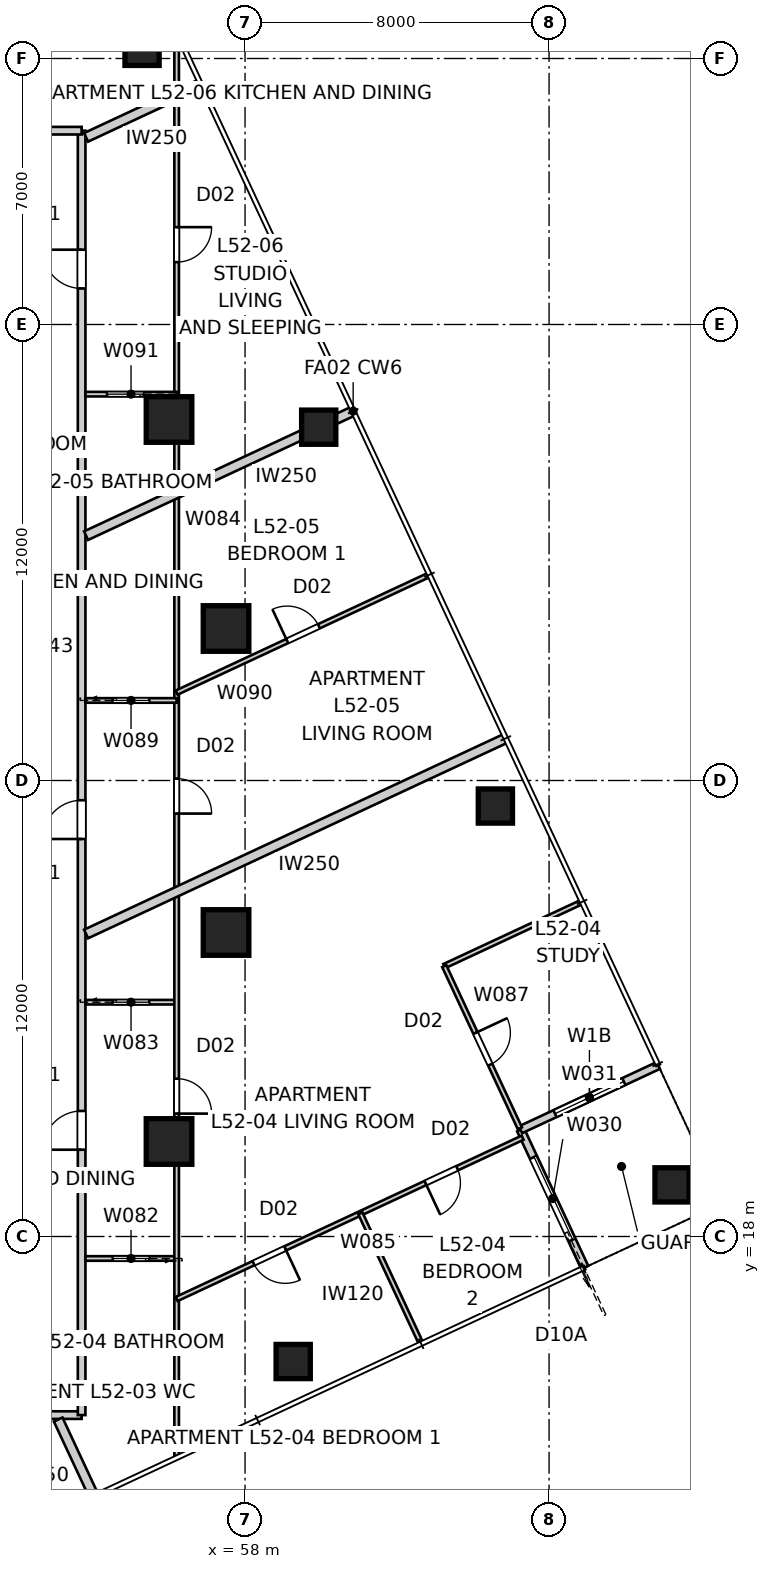
"""IFC4 building model, lengths in metres.
Left out: names, types, materials, properties, quantities, classifications, styles, units other than length and angle.
Written with IfcOpenShell. Run it as: python <this file> out.ifc"""

import sys

from ifc_helpers import new_model, si_unit, direction, frame, frame_2d, origin, origin_2d, place, context, subcontext, project, spatial, rectangle, extrude, element, fill, save


model = new_model("IFC4")
c1 = context("Model", 3, precision=1e-05, world=origin(), true_north=direction((0.0, 1.0)))
c2 = subcontext(c1, "Body", "Model", "MODEL_VIEW")
j1 = project(units=[si_unit("LENGTHUNIT", "METRE"), si_unit("PLANEANGLEUNIT", "RADIAN")], contexts=[c1])
p1 = place(None, origin())
s1 = spatial("IfcSite", under=j1, at=p1, CompositionType="ELEMENT")
p2 = place(p1, origin())
s2 = spatial("IfcBuilding", under=s1, at=p2, CompositionType="ELEMENT")
p3 = place(p2, frame((0.0, 0.0, 189.6)))
s3 = spatial("IfcBuildingStorey", under=s2, at=p3, CompositionType="ELEMENT", Elevation=189.6)
for number, where, z_axis, x_axis in (
    (1, (59.267, 14.71, 0.0), (0.0, 0.0, 1.0), (1.0, 0.0, 0.0)),
    (2, (69.236, 19.359, 0.0), (0.0, 0.0, 1.0), (1.0, 0.0, 0.0)),
    (3, (64.588, 29.328, 0.0), (0.0, 0.0, 1.0), (1.0, 0.0, 0.0)),
    (4, (59.939, 39.298, 0.0), (0.0, 0.0, 1.0), (1.0, 0.0, 0.0)),
    (5, (55.29, 49.267, 0.0), (0.0, 0.0, 1.0), (1.0, 0.0, 0.0)),
):
    element("IfcColumn", number, at=place(p3, frame(where, z_axis=z_axis, x_axis=x_axis)), inside=s3, PredefinedType="COLUMN", context=c2, shape_type="SweptSolid", body=[
        extrude(rectangle(XDim=0.9, YDim=0.9, at=origin_2d()), origin(), (0.0, 0.0, 1.0), 3.4),
    ])
for number, where, z_axis, x_axis in (
    (6, (57.5, 26.0, 0.0), (0.0, 0.0, 1.0), (1.0, 0.0, 0.0)),
    (7, (57.5, 34.0, 0.0), (0.0, 0.0, 1.0), (1.0, 0.0, 0.0)),
    (8, (56.0, 39.5, 0.0), (0.0, 0.0, 1.0), (1.0, 0.0, 0.0)),
    (9, (56.0, 20.5, 0.0), (0.0, 0.0, 1.0), (1.0, 0.0, 0.0)),
):
    element("IfcColumn", number, at=place(p3, frame(where, z_axis=z_axis, x_axis=x_axis)), inside=s3, PredefinedType="COLUMN", context=c2, shape_type="SweptSolid", body=[
        extrude(rectangle(XDim=1.2, YDim=1.2, at=origin_2d()), origin(), (0.0, 0.0, 1.0), 3.4),
    ])
p4 = place(p3, frame((66.94, 17.185, 0.0), z_axis=(0.0, 0.0, 1.0), x_axis=(-0.422658246362, 0.906289140828, 0.0)))
e10 = element("IfcWall", 10, at=p4, inside=s3, PredefinedType="SOLIDWALL", context=c2, shape_type="SweptSolid", body=[
    extrude(rectangle(XDim=4.0, YDim=0.2, at=frame_2d((2.0, 0.0))), origin(), (0.0, 0.0, 1.0), 3.25),
])
p5 = place(p4, frame((0.8, 0.0, 0.0)))
e11 = element("IfcOpeningElement", 11, at=p5, cuts=e10, PredefinedType="OPENING", context=c2, shape_type="SweptSolid", body=[
    extrude(rectangle(XDim=2.4, YDim=2.1, at=frame_2d((1.2, 1.05))), frame((0.0, 0.11, 0.0), z_axis=(0.0, -1.0, 0.0), x_axis=(1.0, 0.0, 0.0)), (0.0, 0.0, 1.0), 0.22),
])
p6 = place(p3, frame((65.25, 20.81, 0.0), z_axis=(0.0, 0.0, 1.0), x_axis=(0.906289140828, 0.422658246362, 0.0)))
e12 = element("IfcWall", 12, at=p6, inside=s3, PredefinedType="SOLIDWALL", context=c2, shape_type="SweptSolid", body=[
    extrude(rectangle(XDim=4.0, YDim=0.2, at=frame_2d((2.0, 0.0))), origin(), (0.0, 0.0, 1.0), 3.25),
])
p7 = place(p6, frame((1.0, 0.0, 0.45)))
e13 = element("IfcOpeningElement", 13, at=p7, cuts=e12, PredefinedType="OPENING", context=c2, shape_type="SweptSolid", body=[
    extrude(rectangle(XDim=2.0, YDim=1.8, at=frame_2d((1.0, 0.9))), frame((0.0, 0.11, 0.0), z_axis=(0.0, -1.0, 0.0), x_axis=(1.0, 0.0, 0.0)), (0.0, 0.0, 1.0), 0.22),
])
p8 = place(p3, frame((47.775, 13.3, 0.0), z_axis=(0.0, 0.0, 1.0), x_axis=(1.0, 0.0, 0.0)))
e14 = element("IfcWall", 14, at=p8, inside=s3, PredefinedType="PARTITIONING", context=c2, shape_type="SweptSolid", body=[
    extrude(rectangle(XDim=5.925, YDim=0.2, at=frame_2d((2.962, 0.0))), origin(), (0.0, 0.0, 1.0), 3.25),
])
p9 = place(p3, frame((53.7, 13.3, 0.0), z_axis=(0.0, 0.0, 1.0), x_axis=(0.0, 1.0, 0.0)))
e15 = element("IfcWall", 15, at=p9, inside=s3, PredefinedType="PARTITIONING", context=c2, shape_type="SweptSolid", body=[
    extrude(rectangle(XDim=33.8, YDim=0.2, at=frame_2d((16.9, 0.0))), origin(), (0.0, 0.0, 1.0), 3.25),
])
p10 = place(p9, frame((6.984, 0.0, 0.0)))
e16 = element("IfcOpeningElement", 16, at=p10, cuts=e15, PredefinedType="OPENING", context=c2, shape_type="SweptSolid", body=[
    extrude(rectangle(XDim=1.02, YDim=2.34, at=frame_2d((0.51, 1.17))), frame((0.0, 0.11, 0.0), z_axis=(0.0, -1.0, 0.0), x_axis=(1.0, 0.0, 0.0)), (0.0, 0.0, 1.0), 0.22),
])
p11 = place(p9, frame((29.648, 0.0, 0.0)))
e17 = element("IfcOpeningElement", 17, at=p11, cuts=e15, PredefinedType="OPENING", context=c2, shape_type="SweptSolid", body=[
    extrude(rectangle(XDim=1.02, YDim=2.34, at=frame_2d((0.51, 1.17))), frame((0.0, 0.11, 0.0), z_axis=(0.0, -1.0, 0.0), x_axis=(1.0, 0.0, 0.0)), (0.0, 0.0, 1.0), 0.22),
])
p12 = place(p9, frame((15.16, 0.0, 0.0)))
e18 = element("IfcOpeningElement", 18, at=p12, cuts=e15, PredefinedType="OPENING", context=c2, shape_type="SweptSolid", body=[
    extrude(rectangle(XDim=1.02, YDim=2.34, at=frame_2d((0.51, 1.17))), frame((0.0, 0.11, 0.0), z_axis=(0.0, -1.0, 0.0), x_axis=(1.0, 0.0, 0.0)), (0.0, 0.0, 1.0), 0.22),
])
p13 = place(p3, frame((53.7, 47.1, 0.0), z_axis=(0.0, 0.0, 1.0), x_axis=(-1.0, 0.0, 0.0)))
e19 = element("IfcWall", 19, at=p13, inside=s3, PredefinedType="PARTITIONING", context=c2, shape_type="SweptSolid", body=[
    extrude(rectangle(XDim=7.392, YDim=0.2, at=frame_2d((3.696, 0.0))), origin(), (0.0, 0.0, 1.0), 3.25),
])
p14 = place(p13, frame((2.506, 0.0, 0.0)))
e20 = element("IfcOpeningElement", 20, at=p14, cuts=e19, PredefinedType="OPENING", context=c2, shape_type="SweptSolid", body=[
    extrude(rectangle(XDim=1.02, YDim=2.34, at=frame_2d((0.51, 1.17))), frame((0.0, 0.11, 0.0), z_axis=(0.0, -1.0, 0.0), x_axis=(1.0, 0.0, 0.0)), (0.0, 0.0, 1.0), 0.22),
])
p15 = place(p3, frame((54.025, 11.162, 0.0), z_axis=(0.0, 0.0, 1.0), x_axis=(-0.422609736898, 0.906311762187, 0.0)))
e21 = element("IfcWall", 21, at=p15, inside=s3, PredefinedType="PARTITIONING", context=c2, shape_type="SweptSolid", body=[
    extrude(rectangle(XDim=2.23, YDim=0.25, at=frame_2d((1.115, 0.0))), origin(), (0.0, 0.0, 1.0), 3.25),
])
p16 = place(p3, frame((60.845, 39.72, 0.0), z_axis=(0.0, 0.0, 1.0), x_axis=(-0.906308569177, -0.422616584432, 0.0)))
e22 = element("IfcWall", 22, at=p16, inside=s3, PredefinedType="PARTITIONING", context=c2, shape_type="SweptSolid", body=[
    extrude(rectangle(XDim=7.755, YDim=0.25, at=frame_2d((3.877, 0.0))), origin(), (0.0, 0.0, 1.0), 3.25),
])
p17 = place(p3, frame((64.86, 31.11, 0.0), z_axis=(0.0, 0.0, 1.0), x_axis=(-0.906303906082, -0.422626584374, 0.0)))
e23 = element("IfcWall", 23, at=p17, inside=s3, PredefinedType="PARTITIONING", context=c2, shape_type="SweptSolid", body=[
    extrude(rectangle(XDim=12.185, YDim=0.25, at=frame_2d((6.092, 0.0))), origin(), (0.0, 0.0, 1.0), 3.25),
])
p18 = place(p3, frame((56.83, 48.33, 0.0), z_axis=(0.0, 0.0, 1.0), x_axis=(-0.906310647924, -0.422612126495, 0.0)))
e24 = element("IfcWall", 24, at=p18, inside=s3, PredefinedType="PARTITIONING", context=c2, shape_type="SweptSolid", body=[
    extrude(rectangle(XDim=3.325, YDim=0.25, at=frame_2d((1.663, 0.0))), origin(), (0.0, 0.0, 1.0), 3.25),
])
p19 = place(p3, frame((56.2, 17.422, 0.0), z_axis=(0.0, 0.0, 1.0), x_axis=(-1.0, 0.0, 0.0)))
e25 = element("IfcWall", 25, at=p19, inside=s3, PredefinedType="PARTITIONING", context=c2, shape_type="SweptSolid", body=[
    extrude(rectangle(XDim=2.4, YDim=0.12, at=frame_2d((1.2, 0.0))), origin(), (0.0, 0.0, 1.0), 3.25),
])
p20 = place(p19, frame((0.72, 0.0, 0.0)))
e26 = element("IfcOpeningElement", 26, at=p20, cuts=e25, PredefinedType="OPENING", context=c2, shape_type="SweptSolid", body=[
    extrude(rectangle(XDim=0.96, YDim=2.1, at=frame_2d((0.48, 1.05))), frame((0.0, 0.07, 0.0), z_axis=(0.0, -1.0, 0.0), x_axis=(1.0, 0.0, 0.0)), (0.0, 0.0, 1.0), 0.14),
])
p21 = place(p3, frame((53.8, 24.166, 0.0), z_axis=(0.0, 0.0, 1.0), x_axis=(1.0, 0.0, 0.0)))
e27 = element("IfcWall", 27, at=p21, inside=s3, PredefinedType="PARTITIONING", context=c2, shape_type="SweptSolid", body=[
    extrude(rectangle(XDim=2.4, YDim=0.12, at=frame_2d((1.2, 0.0))), origin(), (0.0, 0.0, 1.0), 2.796),
])
p22 = place(p21, frame((0.72, 0.0, 0.0)))
e28 = element("IfcOpeningElement", 28, at=p22, cuts=e27, PredefinedType="OPENING", context=c2, shape_type="SweptSolid", body=[
    extrude(rectangle(XDim=0.96, YDim=2.1, at=frame_2d((0.48, 1.05))), frame((0.0, 0.07, 0.0), z_axis=(0.0, -1.0, 0.0), x_axis=(1.0, 0.0, 0.0)), (0.0, 0.0, 1.0), 0.14),
])
p23 = place(p3, frame((56.2, 49.642, 0.0), z_axis=(0.0, 0.0, 1.0), x_axis=(0.0, -1.0, 0.0)))
e29 = element("IfcWall", 29, at=p23, inside=s3, PredefinedType="PARTITIONING", context=c2, shape_type="SweptSolid", body=[
    extrude(rectangle(XDim=37.421, YDim=0.12, at=frame_2d((18.71, 0.0))), origin(), (0.0, 0.0, 1.0), 2.55),
])
p24 = place(p23, frame((27.488, 0.0, 0.0)))
e30 = element("IfcOpeningElement", 30, at=p24, cuts=e29, PredefinedType="OPENING", context=c2, shape_type="SweptSolid", body=[
    extrude(rectangle(XDim=0.92, YDim=2.34, at=frame_2d((0.46, 1.17))), frame((0.0, 0.07, 0.0), z_axis=(0.0, -1.0, 0.0), x_axis=(1.0, 0.0, 0.0)), (0.0, 0.0, 1.0), 0.14),
])
p25 = place(p23, frame((5.08, 0.0, 0.0)))
e31 = element("IfcOpeningElement", 31, at=p25, cuts=e29, PredefinedType="OPENING", context=c2, shape_type="SweptSolid", body=[
    extrude(rectangle(XDim=0.92, YDim=2.34, at=frame_2d((0.46, 1.17))), frame((0.0, 0.07, 0.0), z_axis=(0.0, -1.0, 0.0), x_axis=(1.0, 0.0, 0.0)), (0.0, 0.0, 1.0), 0.14),
])
p26 = place(p23, frame((19.592, 0.0, 0.0)))
e32 = element("IfcOpeningElement", 32, at=p26, cuts=e29, PredefinedType="OPENING", context=c2, shape_type="SweptSolid", body=[
    extrude(rectangle(XDim=0.92, YDim=2.34, at=frame_2d((0.46, 1.17))), frame((0.0, 0.07, 0.0), z_axis=(0.0, -1.0, 0.0), x_axis=(1.0, 0.0, 0.0)), (0.0, 0.0, 1.0), 0.14),
])
p27 = place(p3, frame((65.303, 20.6, 0.0), z_axis=(0.0, 0.0, 1.0), x_axis=(-0.906300466163, -0.422633961049, 0.0)))
e33 = element("IfcWall", 33, at=p27, inside=s3, PredefinedType="PARTITIONING", context=c2, shape_type="SweptSolid", body=[
    extrude(rectangle(XDim=10.044, YDim=0.12, at=frame_2d((5.022, 0.0))), origin(), (0.0, 0.0, 1.0), 3.25),
])
p28 = place(p27, frame((6.892, 0.0, 0.0)))
e34 = element("IfcOpeningElement", 34, at=p28, cuts=e33, PredefinedType="OPENING", context=c2, shape_type="SweptSolid", body=[
    extrude(rectangle(XDim=0.92, YDim=2.34, at=frame_2d((0.46, 1.17))), frame((0.0, 0.07, 0.0), z_axis=(0.0, -1.0, 0.0), x_axis=(1.0, 0.0, 0.0)), (0.0, 0.0, 1.0), 0.14),
])
p29 = place(p27, frame((1.9, 0.0, 0.0)))
e35 = element("IfcOpeningElement", 35, at=p29, cuts=e33, PredefinedType="OPENING", context=c2, shape_type="SweptSolid", body=[
    extrude(rectangle(XDim=0.92, YDim=2.34, at=frame_2d((0.46, 1.17))), frame((0.0, 0.07, 0.0), z_axis=(0.0, -1.0, 0.0), x_axis=(1.0, 0.0, 0.0)), (0.0, 0.0, 1.0), 0.14),
])
p30 = place(p3, frame((66.831, 26.789, 0.0), z_axis=(0.0, 0.0, 1.0), x_axis=(-0.906277619727, -0.422682949718, 0.0)))
e36 = element("IfcWall", 36, at=p30, inside=s3, PredefinedType="PARTITIONING", context=c2, shape_type="SweptSolid", body=[
    extrude(rectangle(XDim=3.96, YDim=0.12, at=frame_2d((1.98, 0.0))), origin(), (0.0, 0.0, 1.0), 3.25),
])
p31 = place(p3, frame((63.242, 25.115, 0.0), z_axis=(0.0, 0.0, 1.0), x_axis=(0.422621536194, -0.906306260127, 0.0)))
e37 = element("IfcWall", 37, at=p31, inside=s3, PredefinedType="PARTITIONING", context=c2, shape_type="SweptSolid", body=[
    extrude(rectangle(XDim=4.71, YDim=0.12, at=frame_2d((2.355, 0.0))), origin(), (0.0, 0.0, 1.0), 3.25),
])
p32 = place(p31, frame((1.94, 0.0, 0.0)))
e38 = element("IfcOpeningElement", 38, at=p32, cuts=e37, PredefinedType="OPENING", context=c2, shape_type="SweptSolid", body=[
    extrude(rectangle(XDim=0.92, YDim=2.34, at=frame_2d((0.46, 1.17))), frame((0.0, 0.07, 0.0), z_axis=(0.0, -1.0, 0.0), x_axis=(1.0, 0.0, 0.0)), (0.0, 0.0, 1.0), 0.14),
])
p33 = place(p3, frame((61.035, 18.609, 0.0), z_axis=(0.0, 0.0, 1.0), x_axis=(0.422600090785, -0.906316260071, 0.0)))
e39 = element("IfcWall", 39, at=p33, inside=s3, PredefinedType="PARTITIONING", context=c2, shape_type="SweptSolid", body=[
    extrude(rectangle(XDim=3.747, YDim=0.12, at=frame_2d((1.874, 0.0))), origin(), (0.0, 0.0, 1.0), 3.25),
])
p34 = place(p3, frame((53.8, 32.107, 0.0), z_axis=(0.0, 0.0, 1.0), x_axis=(1.0, 0.0, 0.0)))
e40 = element("IfcWall", 40, at=p34, inside=s3, PredefinedType="PARTITIONING", context=c2, shape_type="SweptSolid", body=[
    extrude(rectangle(XDim=2.4, YDim=0.12, at=frame_2d((1.2, 0.0))), origin(), (0.0, 0.0, 1.0), 3.25),
])
p35 = place(p34, frame((0.72, 0.0, 0.0)))
e41 = element("IfcOpeningElement", 41, at=p35, cuts=e40, PredefinedType="OPENING", context=c2, shape_type="SweptSolid", body=[
    extrude(rectangle(XDim=0.96, YDim=2.1, at=frame_2d((0.48, 1.05))), frame((0.0, 0.07, 0.0), z_axis=(0.0, -1.0, 0.0), x_axis=(1.0, 0.0, 0.0)), (0.0, 0.0, 1.0), 0.14),
])
p36 = place(p3, frame((56.2, 32.313, 0.0), z_axis=(0.0, 0.0, 1.0), x_axis=(0.906306986906, 0.422619977621, 0.0)))
e42 = element("IfcWall", 42, at=p36, inside=s3, PredefinedType="PARTITIONING", context=c2, shape_type="SweptSolid", body=[
    extrude(rectangle(XDim=7.3, YDim=0.12, at=frame_2d((3.65, 0.0))), origin(), (0.0, 0.0, 1.0), 3.25),
])
p37 = place(p36, frame((3.21, 0.0, 0.0)))
e43 = element("IfcOpeningElement", 43, at=p37, cuts=e42, PredefinedType="OPENING", context=c2, shape_type="SweptSolid", body=[
    extrude(rectangle(XDim=0.92, YDim=2.34, at=frame_2d((0.46, 1.17))), frame((0.0, 0.07, 0.0), z_axis=(0.0, -1.0, 0.0), x_axis=(1.0, 0.0, 0.0)), (0.0, 0.0, 1.0), 0.14),
])
p38 = place(p3, frame((56.2, 40.167, 0.0), z_axis=(0.0, 0.0, 1.0), x_axis=(-1.0, 0.0, 0.0)))
e44 = element("IfcWall", 44, at=p38, inside=s3, PredefinedType="PARTITIONING", context=c2, shape_type="SweptSolid", body=[
    extrude(rectangle(XDim=2.4, YDim=0.12, at=frame_2d((1.2, 0.0))), origin(), (0.0, 0.0, 1.0), 3.25),
])
p39 = place(p38, frame((0.87, 0.0, 0.0)))
e45 = element("IfcOpeningElement", 45, at=p39, cuts=e44, PredefinedType="OPENING", context=c2, shape_type="SweptSolid", body=[
    extrude(rectangle(XDim=0.96, YDim=2.1, at=frame_2d((0.48, 1.05))), frame((0.0, 0.07, 0.0), z_axis=(0.0, -1.0, 0.0), x_axis=(1.0, 0.0, 0.0)), (0.0, 0.0, 1.0), 0.14),
])
p40 = place(p5, origin())
e46 = element("IfcDoor", 46, at=p40, inside=s3, OperationType="SLIDING_TO_LEFT", PredefinedType="DOOR", context=c2, shape_type="SweptSolid", body=[
    extrude(rectangle(XDim=2.4, YDim=2.1, at=frame_2d((1.2, 1.05))), frame((0.0, 0.025, 0.0), z_axis=(0.0, -1.0, 0.0), x_axis=(1.0, 0.0, 0.0)), (0.0, 0.0, 1.0), 0.05),
])
fill(e11, e46)
p41 = place(p7, origin())
e47 = element("IfcWindow", 47, at=p41, inside=s3, PartitioningType="SINGLE_PANEL", PredefinedType="WINDOW", context=c2, shape_type="SweptSolid", body=[
    extrude(rectangle(XDim=2.0, YDim=1.8, at=frame_2d((1.0, 0.9))), frame((0.0, 0.03, 0.0), z_axis=(0.0, -1.0, 0.0), x_axis=(1.0, 0.0, 0.0)), (0.0, 0.0, 1.0), 0.06),
])
fill(e13, e47)
p42 = place(p10, origin())
e48 = element("IfcDoor", 48, at=p42, inside=s3, OperationType="SINGLE_SWING_LEFT", PredefinedType="DOOR", context=c2, shape_type="SweptSolid", body=[
    extrude(rectangle(XDim=1.02, YDim=2.34, at=frame_2d((0.51, 1.17))), frame((0.0, 0.025, 0.0), z_axis=(0.0, -1.0, 0.0), x_axis=(1.0, 0.0, 0.0)), (0.0, 0.0, 1.0), 0.05),
])
fill(e16, e48)
p43 = place(p11, origin())
e49 = element("IfcDoor", 49, at=p43, inside=s3, OperationType="SINGLE_SWING_RIGHT", PredefinedType="DOOR", context=c2, shape_type="SweptSolid", body=[
    extrude(rectangle(XDim=1.02, YDim=2.34, at=frame_2d((0.51, 1.17))), frame((0.0, 0.025, 0.0), z_axis=(0.0, -1.0, 0.0), x_axis=(1.0, 0.0, 0.0)), (0.0, 0.0, 1.0), 0.05),
])
fill(e17, e49)
p44 = place(p12, origin())
e50 = element("IfcDoor", 50, at=p44, inside=s3, OperationType="SINGLE_SWING_LEFT", PredefinedType="DOOR", context=c2, shape_type="SweptSolid", body=[
    extrude(rectangle(XDim=1.02, YDim=2.34, at=frame_2d((0.51, 1.17))), frame((0.0, 0.025, 0.0), z_axis=(0.0, -1.0, 0.0), x_axis=(1.0, 0.0, 0.0)), (0.0, 0.0, 1.0), 0.05),
])
fill(e18, e50)
p45 = place(p24, origin())
e51 = element("IfcDoor", 51, at=p45, inside=s3, OperationType="SINGLE_SWING_RIGHT", PredefinedType="DOOR", context=c2, shape_type="SweptSolid", body=[
    extrude(rectangle(XDim=0.92, YDim=2.34, at=frame_2d((0.46, 1.17))), frame((0.0, 0.025, 0.0), z_axis=(0.0, -1.0, 0.0), x_axis=(1.0, 0.0, 0.0)), (0.0, 0.0, 1.0), 0.05),
])
fill(e30, e51)
p46 = place(p20, origin())
e52 = element("IfcDoor", 52, at=p46, inside=s3, OperationType="SLIDING_TO_LEFT", PredefinedType="DOOR", context=c2, shape_type="SweptSolid", body=[
    extrude(rectangle(XDim=0.96, YDim=2.1, at=frame_2d((0.48, 1.05))), frame((0.0, 0.025, 0.0), z_axis=(0.0, -1.0, 0.0), x_axis=(1.0, 0.0, 0.0)), (0.0, 0.0, 1.0), 0.05),
])
fill(e26, e52)
p47 = place(p22, origin())
e53 = element("IfcDoor", 53, at=p47, inside=s3, OperationType="SLIDING_TO_LEFT", PredefinedType="DOOR", context=c2, shape_type="SweptSolid", body=[
    extrude(rectangle(XDim=0.96, YDim=2.1, at=frame_2d((0.48, 1.05))), frame((0.0, 0.025, 0.0), z_axis=(0.0, -1.0, 0.0), x_axis=(1.0, 0.0, 0.0)), (0.0, 0.0, 1.0), 0.05),
])
fill(e28, e53)
p48 = place(p25, origin())
e54 = element("IfcDoor", 54, at=p48, inside=s3, OperationType="SINGLE_SWING_LEFT", PredefinedType="DOOR", context=c2, shape_type="SweptSolid", body=[
    extrude(rectangle(XDim=0.92, YDim=2.34, at=frame_2d((0.46, 1.17))), frame((0.0, 0.025, 0.0), z_axis=(0.0, -1.0, 0.0), x_axis=(1.0, 0.0, 0.0)), (0.0, 0.0, 1.0), 0.05),
])
fill(e31, e54)
p49 = place(p39, origin())
e55 = element("IfcDoor", 55, at=p49, inside=s3, OperationType="SLIDING_TO_LEFT", PredefinedType="DOOR", context=c2, shape_type="SweptSolid", body=[
    extrude(rectangle(XDim=0.96, YDim=2.1, at=frame_2d((0.48, 1.05))), frame((0.0, 0.025, 0.0), z_axis=(0.0, -1.0, 0.0), x_axis=(1.0, 0.0, 0.0)), (0.0, 0.0, 1.0), 0.05),
])
fill(e45, e55)
p50 = place(p26, origin())
e56 = element("IfcDoor", 56, at=p50, inside=s3, OperationType="SINGLE_SWING_RIGHT", PredefinedType="DOOR", context=c2, shape_type="SweptSolid", body=[
    extrude(rectangle(XDim=0.92, YDim=2.34, at=frame_2d((0.46, 1.17))), frame((0.0, 0.025, 0.0), z_axis=(0.0, -1.0, 0.0), x_axis=(1.0, 0.0, 0.0)), (0.0, 0.0, 1.0), 0.05),
])
fill(e32, e56)
p51 = place(p35, origin())
e57 = element("IfcDoor", 57, at=p51, inside=s3, OperationType="SLIDING_TO_LEFT", PredefinedType="DOOR", context=c2, shape_type="SweptSolid", body=[
    extrude(rectangle(XDim=0.96, YDim=2.1, at=frame_2d((0.48, 1.05))), frame((0.0, 0.025, 0.0), z_axis=(0.0, -1.0, 0.0), x_axis=(1.0, 0.0, 0.0)), (0.0, 0.0, 1.0), 0.05),
])
fill(e41, e57)
p52 = place(p28, origin())
e58 = element("IfcDoor", 58, at=p52, inside=s3, OperationType="SINGLE_SWING_LEFT", PredefinedType="DOOR", context=c2, shape_type="SweptSolid", body=[
    extrude(rectangle(XDim=0.92, YDim=2.34, at=frame_2d((0.46, 1.17))), frame((0.0, 0.025, 0.0), z_axis=(0.0, -1.0, 0.0), x_axis=(1.0, 0.0, 0.0)), (0.0, 0.0, 1.0), 0.05),
])
fill(e34, e58)
p53 = place(p29, origin())
e59 = element("IfcDoor", 59, at=p53, inside=s3, OperationType="SINGLE_SWING_RIGHT", PredefinedType="DOOR", context=c2, shape_type="SweptSolid", body=[
    extrude(rectangle(XDim=0.92, YDim=2.34, at=frame_2d((0.46, 1.17))), frame((0.0, 0.025, 0.0), z_axis=(0.0, -1.0, 0.0), x_axis=(1.0, 0.0, 0.0)), (0.0, 0.0, 1.0), 0.05),
])
fill(e35, e59)
p54 = place(p32, origin())
e60 = element("IfcDoor", 60, at=p54, inside=s3, OperationType="SINGLE_SWING_LEFT", PredefinedType="DOOR", context=c2, shape_type="SweptSolid", body=[
    extrude(rectangle(XDim=0.92, YDim=2.34, at=frame_2d((0.46, 1.17))), frame((0.0, 0.025, 0.0), z_axis=(0.0, -1.0, 0.0), x_axis=(1.0, 0.0, 0.0)), (0.0, 0.0, 1.0), 0.05),
])
fill(e38, e60)
p55 = place(p37, origin())
e61 = element("IfcDoor", 61, at=p55, inside=s3, OperationType="SINGLE_SWING_LEFT", PredefinedType="DOOR", context=c2, shape_type="SweptSolid", body=[
    extrude(rectangle(XDim=0.92, YDim=2.34, at=frame_2d((0.46, 1.17))), frame((0.0, 0.025, 0.0), z_axis=(0.0, -1.0, 0.0), x_axis=(1.0, 0.0, 0.0)), (0.0, 0.0, 1.0), 0.05),
])
fill(e43, e61)
save(model, sys.argv[1])
